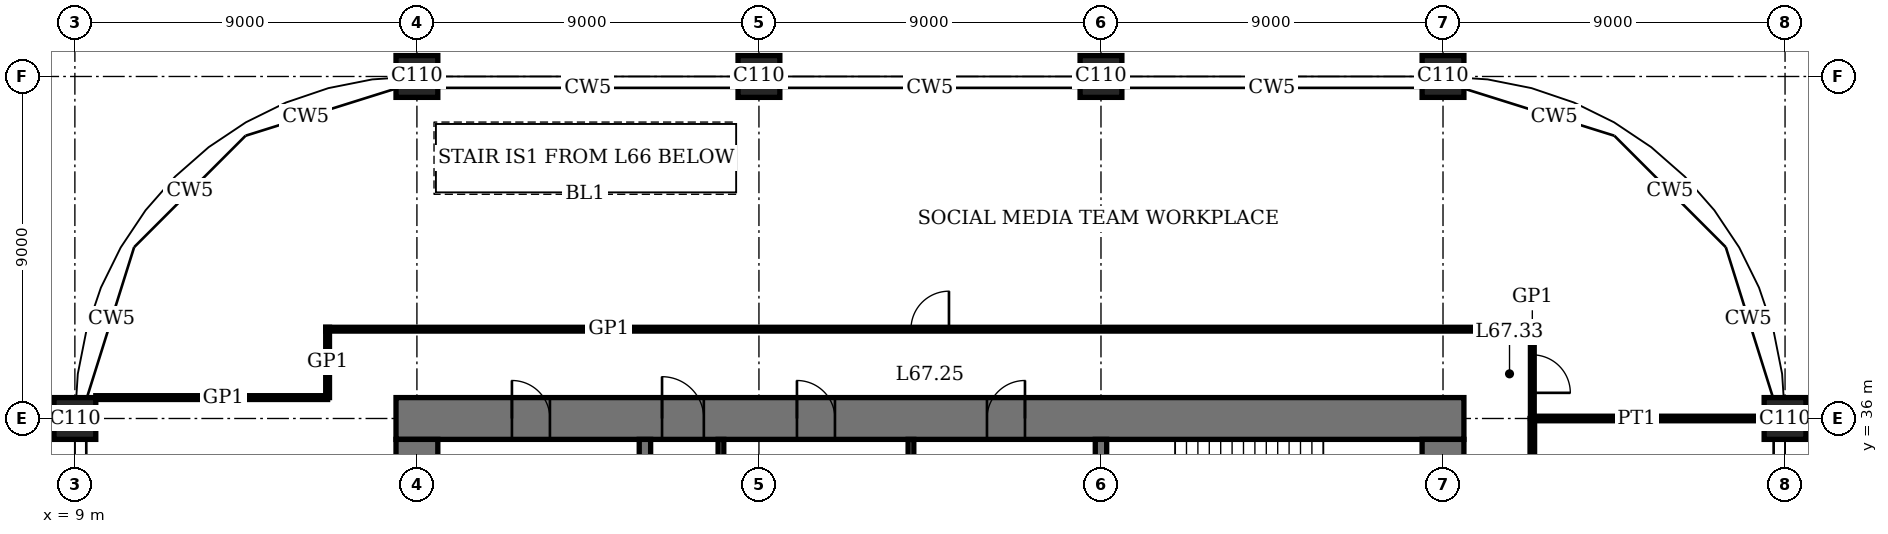
"""IFC4 building model, lengths in metres.
Left out: names, types, materials, properties, quantities, classifications, styles, units other than length and angle.
Written with IfcOpenShell. Run it as: python <this file> out.ifc"""

import sys

from ifc_helpers import new_model, si_unit, direction, frame, frame_2d, origin, origin_2d, place, context, subcontext, project, spatial, rectangle, extrude, element, fill, save


model = new_model("IFC4")
c1 = context("Model", 3, precision=1e-05, world=origin(), true_north=direction((0.0, 1.0)))
c2 = subcontext(c1, "Body", "Model", "MODEL_VIEW")
j1 = project(units=[si_unit("LENGTHUNIT", "METRE"), si_unit("PLANEANGLEUNIT", "RADIAN")], contexts=[c1])
p1 = place(None, origin())
s1 = spatial("IfcSite", under=j1, at=p1, CompositionType="ELEMENT")
p2 = place(p1, origin())
s2 = spatial("IfcBuilding", under=s1, at=p2, CompositionType="ELEMENT")
p3 = place(p2, frame((0.0, 0.0, 275.4)))
s3 = spatial("IfcBuildingStorey", under=s2, at=p3, CompositionType="ELEMENT", Elevation=275.4)
for number, where, z_axis, x_axis in (
    (1, (9.0, 36.0, 0.0), (0.0, 0.0, 1.0), (1.0, 0.0, 0.0)),
    (2, (18.0, 45.0, 0.0), (0.0, 0.0, 1.0), (1.0, 0.0, 0.0)),
    (3, (27.0, 45.0, 0.0), (0.0, 0.0, 1.0), (1.0, 0.0, 0.0)),
    (4, (36.0, 45.0, 0.0), (0.0, 0.0, 1.0), (1.0, 0.0, 0.0)),
    (5, (45.0, 45.0, 0.0), (0.0, 0.0, 1.0), (1.0, 0.0, 0.0)),
    (6, (54.0, 36.0, 0.0), (0.0, 0.0, 1.0), (1.0, 0.0, 0.0)),
):
    element("IfcColumn", number, at=place(p3, frame(where, z_axis=z_axis, x_axis=x_axis)), inside=s3, PredefinedType="COLUMN", context=c2, shape_type="SweptSolid", body=[
        extrude(rectangle(XDim=1.1, YDim=1.1, at=origin_2d()), origin(), (0.0, 0.0, 1.0), 4.0),
    ])
p4 = place(p3, frame((45.55, 36.0, 0.0), z_axis=(0.0, 0.0, 1.0), x_axis=(-1.0, 0.0, 0.0)))
e7 = element("IfcWall", 7, at=p4, inside=s3, PredefinedType="SHEAR", context=c2, shape_type="SweptSolid", body=[
    extrude(rectangle(XDim=28.1, YDim=1.1, at=frame_2d((14.05, 0.0))), origin(), (0.0, 0.0, 1.0), 4.0),
])
p5 = place(p4, frame((11.55, 0.0, 0.0)))
e8 = element("IfcOpeningElement", 8, at=p5, cuts=e7, PredefinedType="OPENING", context=c2, shape_type="SweptSolid", body=[
    extrude(rectangle(XDim=1.0, YDim=2.4, at=frame_2d((0.5, 1.2))), frame((0.0, 0.56, 0.0), z_axis=(0.0, -1.0, 0.0), x_axis=(1.0, 0.0, 0.0)), (0.0, 0.0, 1.0), 1.12),
])
p6 = place(p4, frame((16.55, 0.0, 0.0)))
e9 = element("IfcOpeningElement", 9, at=p6, cuts=e7, PredefinedType="OPENING", context=c2, shape_type="SweptSolid", body=[
    extrude(rectangle(XDim=1.0, YDim=2.4, at=frame_2d((0.5, 1.2))), frame((0.0, 0.56, 0.0), z_axis=(0.0, -1.0, 0.0), x_axis=(1.0, 0.0, 0.0)), (0.0, 0.0, 1.0), 1.12),
])
p7 = place(p4, frame((20.0, 0.0, 0.0)))
e10 = element("IfcOpeningElement", 10, at=p7, cuts=e7, PredefinedType="OPENING", context=c2, shape_type="SweptSolid", body=[
    extrude(rectangle(XDim=1.1, YDim=2.4, at=frame_2d((0.55, 1.2))), frame((0.0, 0.56, 0.0), z_axis=(0.0, -1.0, 0.0), x_axis=(1.0, 0.0, 0.0)), (0.0, 0.0, 1.0), 1.12),
])
p8 = place(p4, frame((24.05, 0.0, 0.0)))
e11 = element("IfcOpeningElement", 11, at=p8, cuts=e7, PredefinedType="OPENING", context=c2, shape_type="SweptSolid", body=[
    extrude(rectangle(XDim=1.0, YDim=2.4, at=frame_2d((0.5, 1.2))), frame((0.0, 0.56, 0.0), z_axis=(0.0, -1.0, 0.0), x_axis=(1.0, 0.0, 0.0)), (0.0, 0.0, 1.0), 1.12),
])
p9 = place(p3, frame((18.0, 35.45, 0.0), z_axis=(0.0, 0.0, 1.0), x_axis=(0.0, -1.0, 0.0)))
e12 = element("IfcWall", 12, at=p9, inside=s3, PredefinedType="SHEAR", context=c2, shape_type="SweptSolid", body=[
    extrude(rectangle(XDim=16.9, YDim=1.1, at=frame_2d((8.45, 0.0))), origin(), (0.0, 0.0, 1.0), 4.0),
])
p10 = place(p9, frame((8.45, 0.0, 0.0)))
e13 = element("IfcOpeningElement", 13, at=p10, cuts=e12, PredefinedType="OPENING", context=c2, shape_type="SweptSolid", body=[
    extrude(rectangle(XDim=1.8, YDim=2.4, at=frame_2d((0.9, 1.2))), frame((0.0, 0.56, 0.0), z_axis=(0.0, -1.0, 0.0), x_axis=(1.0, 0.0, 0.0)), (0.0, 0.0, 1.0), 1.12),
])
p11 = place(p3, frame((45.0, 18.55, 0.0), z_axis=(0.0, 0.0, 1.0), x_axis=(0.0, 1.0, 0.0)))
e14 = element("IfcWall", 14, at=p11, inside=s3, PredefinedType="SHEAR", context=c2, shape_type="SweptSolid", body=[
    extrude(rectangle(XDim=16.9, YDim=1.1, at=frame_2d((8.45, 0.0))), origin(), (0.0, 0.0, 1.0), 4.0),
])
p12 = place(p11, frame((8.45, 0.0, 0.0)))
e15 = element("IfcOpeningElement", 15, at=p12, cuts=e14, PredefinedType="OPENING", context=c2, shape_type="SweptSolid", body=[
    extrude(rectangle(XDim=1.8, YDim=2.4, at=frame_2d((0.9, 1.2))), frame((0.0, 0.56, 0.0), z_axis=(0.0, -1.0, 0.0), x_axis=(1.0, 0.0, 0.0)), (0.0, 0.0, 1.0), 1.12),
])
p13 = place(p3, frame((36.0, 32.4, 0.0), z_axis=(0.0, 0.0, 1.0), x_axis=(0.0, 1.0, 0.0)))
e16 = element("IfcWall", 16, at=p13, inside=s3, PredefinedType="SHEAR", context=c2, shape_type="SweptSolid", body=[
    extrude(rectangle(XDim=3.05, YDim=0.3, at=frame_2d((1.525, 0.0))), origin(), (0.0, 0.0, 1.0), 4.0),
])
p14 = place(p3, frame((24.0, 29.55, 0.0), z_axis=(0.0, 0.0, 1.0), x_axis=(0.0, 1.0, 0.0)))
e17 = element("IfcWall", 17, at=p14, inside=s3, PredefinedType="SHEAR", context=c2, shape_type="SweptSolid", body=[
    extrude(rectangle(XDim=5.9, YDim=0.3, at=frame_2d((2.95, 0.0))), origin(), (0.0, 0.0, 1.0), 4.0),
])
p15 = place(p3, frame((47.35, 36.0, 0.0), z_axis=(0.0, 0.0, 1.0), x_axis=(1.0, 0.0, 0.0)))
e18 = element("IfcWall", 18, at=p15, inside=s3, PredefinedType="PARTITIONING", context=c2, shape_type="SweptSolid", body=[
    extrude(rectangle(XDim=6.1, YDim=0.12, at=frame_2d((3.05, 0.0))), origin(), (0.0, 0.0, 1.0), 3.05),
])
p16 = place(p3, frame((9.55, 36.55, 0.0), z_axis=(0.0, 0.0, 1.0), x_axis=(1.0, 0.0, 0.0)))
e19 = element("IfcWall", 19, at=p16, inside=s3, PredefinedType="PARTITIONING", context=c2, shape_type="SweptSolid", body=[
    extrude(rectangle(XDim=6.1, YDim=0.1, at=frame_2d((3.05, 0.0))), origin(), (0.0, 0.0, 1.0), 3.75),
])
p17 = place(p3, frame((15.6, 38.35, 0.0), z_axis=(0.0, 0.0, 1.0), x_axis=(1.0, 0.0, 0.0)))
e20 = element("IfcWall", 20, at=p17, inside=s3, PredefinedType="PARTITIONING", context=c2, shape_type="SweptSolid", body=[
    extrude(rectangle(XDim=31.8, YDim=0.1, at=frame_2d((15.9, 0.0))), origin(), (0.0, 0.0, 1.0), 3.75),
])
p18 = place(p17, frame((15.4, 0.0, 0.0)))
e21 = element("IfcOpeningElement", 21, at=p18, cuts=e20, PredefinedType="OPENING", context=c2, shape_type="SweptSolid", body=[
    extrude(rectangle(XDim=1.0, YDim=2.4, at=frame_2d((0.5, 1.2))), frame((0.0, 0.06, 0.0), z_axis=(0.0, -1.0, 0.0), x_axis=(1.0, 0.0, 0.0)), (0.0, 0.0, 1.0), 0.12),
])
p19 = place(p3, frame((15.65, 36.55, 0.0), z_axis=(0.0, 0.0, 1.0), x_axis=(0.0, 1.0, 0.0)))
e22 = element("IfcWall", 22, at=p19, inside=s3, PredefinedType="PARTITIONING", context=c2, shape_type="SweptSolid", body=[
    extrude(rectangle(XDim=1.85, YDim=0.1, at=frame_2d((0.925, 0.0))), origin(), (0.0, 0.0, 1.0), 3.75),
])
p20 = place(p3, frame((47.35, 27.0, 0.0), z_axis=(0.0, 0.0, 1.0), x_axis=(0.0, 1.0, 0.0)))
e23 = element("IfcWall", 23, at=p20, inside=s3, PredefinedType="PARTITIONING", context=c2, shape_type="SweptSolid", body=[
    extrude(rectangle(XDim=9.0, YDim=0.12, at=frame_2d((4.5, 0.0))), origin(), (0.0, 0.0, 1.0), 3.75),
])
p21 = place(p20, frame((4.0, 0.0, 0.0)))
e24 = element("IfcOpeningElement", 24, at=p21, cuts=e23, PredefinedType="OPENING", context=c2, shape_type="SweptSolid", body=[
    extrude(rectangle(XDim=1.0, YDim=2.4, at=frame_2d((0.5, 1.2))), frame((0.0, 0.07, 0.0), z_axis=(0.0, -1.0, 0.0), x_axis=(1.0, 0.0, 0.0)), (0.0, 0.0, 1.0), 0.14),
])
p22 = place(p3, frame((47.35, 36.0, 0.0), z_axis=(0.0, 0.0, 1.0), x_axis=(0.0, 1.0, 0.0)))
e25 = element("IfcWall", 25, at=p22, inside=s3, PredefinedType="PARTITIONING", context=c2, shape_type="SweptSolid", body=[
    extrude(rectangle(XDim=2.35, YDim=0.1, at=frame_2d((1.175, 0.0))), origin(), (0.0, 0.0, 1.0), 3.75),
])
p23 = place(p22, frame((0.675, 0.0, 0.0)))
e26 = element("IfcOpeningElement", 26, at=p23, cuts=e25, PredefinedType="OPENING", context=c2, shape_type="SweptSolid", body=[
    extrude(rectangle(XDim=1.0, YDim=2.4, at=frame_2d((0.5, 1.2))), frame((0.0, 0.06, 0.0), z_axis=(0.0, -1.0, 0.0), x_axis=(1.0, 0.0, 0.0)), (0.0, 0.0, 1.0), 0.12),
])
for number, where, z_axis, x_axis in (
    (27, (31.0, 32.55, 0.0), (0.0, 0.0, 1.0), (0.0, 1.0, 0.0)),
    (28, (26.0, 32.55, 0.0), (0.0, 0.0, 1.0), (0.0, 1.0, 0.0)),
):
    element("IfcWall", number, at=place(p3, frame(where, z_axis=z_axis, x_axis=x_axis)), inside=s3, PredefinedType="PARTITIONING", context=c2, shape_type="SweptSolid", body=[
        extrude(rectangle(XDim=2.9, YDim=0.15, at=frame_2d((1.45, 0.0))), origin(), (0.0, 0.0, 1.0), 3.75),
    ])
p24 = place(p5, origin())
e29 = element("IfcDoor", 29, at=p24, inside=s3, OperationType="SINGLE_SWING_LEFT", PredefinedType="DOOR", context=c2, shape_type="SweptSolid", body=[
    extrude(rectangle(XDim=1.0, YDim=2.4, at=frame_2d((0.5, 1.2))), frame((0.0, 0.025, 0.0), z_axis=(0.0, -1.0, 0.0), x_axis=(1.0, 0.0, 0.0)), (0.0, 0.0, 1.0), 0.05),
    extrude(rectangle(XDim=0.04, YDim=2.4, at=frame_2d((0.02, 1.2))), frame((0.0, 0.4, 0.0), z_axis=(0.0, -1.0, 0.0), x_axis=(1.0, 0.0, 0.0)), (0.0, 0.0, 1.0), 0.8),
    extrude(rectangle(XDim=0.04, YDim=2.4, at=frame_2d((0.98, 1.2))), frame((0.0, 0.4, 0.0), z_axis=(0.0, -1.0, 0.0), x_axis=(1.0, 0.0, 0.0)), (0.0, 0.0, 1.0), 0.8),
    extrude(rectangle(XDim=1.0, YDim=0.04, at=frame_2d((0.5, 2.38))), frame((0.0, 0.4, 0.0), z_axis=(0.0, -1.0, 0.0), x_axis=(1.0, 0.0, 0.0)), (0.0, 0.0, 1.0), 0.8),
])
fill(e8, e29)
p25 = place(p6, origin())
e30 = element("IfcDoor", 30, at=p25, inside=s3, OperationType="SINGLE_SWING_RIGHT", PredefinedType="DOOR", context=c2, shape_type="SweptSolid", body=[
    extrude(rectangle(XDim=1.0, YDim=2.4, at=frame_2d((0.5, 1.2))), frame((0.0, 0.025, 0.0), z_axis=(0.0, -1.0, 0.0), x_axis=(1.0, 0.0, 0.0)), (0.0, 0.0, 1.0), 0.05),
    extrude(rectangle(XDim=0.04, YDim=2.4, at=frame_2d((0.02, 1.2))), frame((0.0, 0.4, 0.0), z_axis=(0.0, -1.0, 0.0), x_axis=(1.0, 0.0, 0.0)), (0.0, 0.0, 1.0), 0.8),
    extrude(rectangle(XDim=0.04, YDim=2.4, at=frame_2d((0.98, 1.2))), frame((0.0, 0.4, 0.0), z_axis=(0.0, -1.0, 0.0), x_axis=(1.0, 0.0, 0.0)), (0.0, 0.0, 1.0), 0.8),
    extrude(rectangle(XDim=1.0, YDim=0.04, at=frame_2d((0.5, 2.38))), frame((0.0, 0.4, 0.0), z_axis=(0.0, -1.0, 0.0), x_axis=(1.0, 0.0, 0.0)), (0.0, 0.0, 1.0), 0.8),
])
fill(e9, e30)
p26 = place(p7, origin())
e31 = element("IfcDoor", 31, at=p26, inside=s3, OperationType="SINGLE_SWING_RIGHT", PredefinedType="DOOR", context=c2, shape_type="SweptSolid", body=[
    extrude(rectangle(XDim=1.1, YDim=2.4, at=frame_2d((0.55, 1.2))), frame((0.0, 0.025, 0.0), z_axis=(0.0, -1.0, 0.0), x_axis=(1.0, 0.0, 0.0)), (0.0, 0.0, 1.0), 0.05),
    extrude(rectangle(XDim=0.04, YDim=2.4, at=frame_2d((0.02, 1.2))), frame((0.0, 0.44, 0.0), z_axis=(0.0, -1.0, 0.0), x_axis=(1.0, 0.0, 0.0)), (0.0, 0.0, 1.0), 0.88),
    extrude(rectangle(XDim=0.04, YDim=2.4, at=frame_2d((1.08, 1.2))), frame((0.0, 0.44, 0.0), z_axis=(0.0, -1.0, 0.0), x_axis=(1.0, 0.0, 0.0)), (0.0, 0.0, 1.0), 0.88),
    extrude(rectangle(XDim=1.1, YDim=0.04, at=frame_2d((0.55, 2.38))), frame((0.0, 0.44, 0.0), z_axis=(0.0, -1.0, 0.0), x_axis=(1.0, 0.0, 0.0)), (0.0, 0.0, 1.0), 0.88),
])
fill(e10, e31)
p27 = place(p8, origin())
e32 = element("IfcDoor", 32, at=p27, inside=s3, OperationType="SINGLE_SWING_RIGHT", PredefinedType="DOOR", context=c2, shape_type="SweptSolid", body=[
    extrude(rectangle(XDim=1.0, YDim=2.4, at=frame_2d((0.5, 1.2))), frame((0.0, 0.025, 0.0), z_axis=(0.0, -1.0, 0.0), x_axis=(1.0, 0.0, 0.0)), (0.0, 0.0, 1.0), 0.05),
    extrude(rectangle(XDim=0.04, YDim=2.4, at=frame_2d((0.02, 1.2))), frame((0.0, 0.4, 0.0), z_axis=(0.0, -1.0, 0.0), x_axis=(1.0, 0.0, 0.0)), (0.0, 0.0, 1.0), 0.8),
    extrude(rectangle(XDim=0.04, YDim=2.4, at=frame_2d((0.98, 1.2))), frame((0.0, 0.4, 0.0), z_axis=(0.0, -1.0, 0.0), x_axis=(1.0, 0.0, 0.0)), (0.0, 0.0, 1.0), 0.8),
    extrude(rectangle(XDim=1.0, YDim=0.04, at=frame_2d((0.5, 2.38))), frame((0.0, 0.4, 0.0), z_axis=(0.0, -1.0, 0.0), x_axis=(1.0, 0.0, 0.0)), (0.0, 0.0, 1.0), 0.8),
])
fill(e11, e32)
p28 = place(p18, origin())
e33 = element("IfcDoor", 33, at=p28, inside=s3, OperationType="SINGLE_SWING_LEFT", PredefinedType="DOOR", context=c2, shape_type="SweptSolid", body=[
    extrude(rectangle(XDim=1.0, YDim=2.4, at=frame_2d((0.5, 1.2))), frame((0.0, 0.02, 0.0), z_axis=(0.0, -1.0, 0.0), x_axis=(1.0, 0.0, 0.0)), (0.0, 0.0, 1.0), 0.04),
])
fill(e21, e33)
p29 = place(p23, origin())
e34 = element("IfcDoor", 34, at=p29, inside=s3, OperationType="SINGLE_SWING_LEFT", PredefinedType="DOOR", context=c2, shape_type="SweptSolid", body=[
    extrude(rectangle(XDim=1.0, YDim=2.4, at=frame_2d((0.5, 1.2))), frame((0.0, 0.02, 0.0), z_axis=(0.0, -1.0, 0.0), x_axis=(1.0, 0.0, 0.0)), (0.0, 0.0, 1.0), 0.04),
])
fill(e26, e34)
save(model, sys.argv[1])
